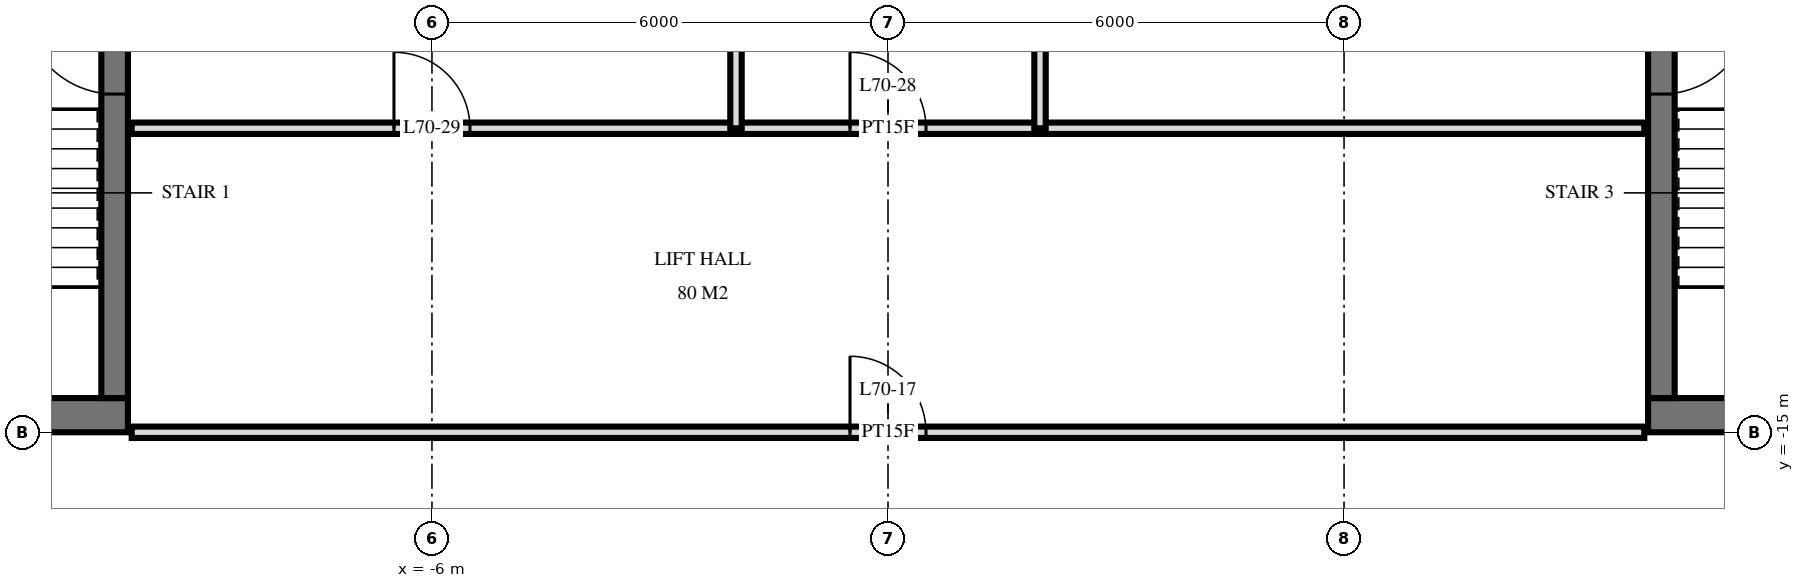
"""IFC4 building model, lengths in metres.
Left out: names, types, materials, properties, quantities, classifications, styles, units other than length and angle.
Written with IfcOpenShell. Run it as: python <this file> out.ifc"""

import sys

from ifc_helpers import new_model, si_unit, direction, frame, frame_2d, origin, place, context, subcontext, project, spatial, rectangle, extrude, element, fill, save


model = new_model("IFC4")
c1 = context("Model", 3, precision=1e-05, world=origin(), true_north=direction((0.0, 1.0)))
c2 = subcontext(c1, "Body", "Model", "MODEL_VIEW")
j1 = project(units=[si_unit("LENGTHUNIT", "METRE"), si_unit("PLANEANGLEUNIT", "RADIAN")], contexts=[c1])
p1 = place(None, origin())
s1 = spatial("IfcSite", under=j1, at=p1, CompositionType="ELEMENT")
p2 = place(p1, origin())
s2 = spatial("IfcBuilding", under=s1, at=p2, CompositionType="ELEMENT")
p3 = place(p2, frame((0.0, 0.0, 266.6)))
s3 = spatial("IfcBuildingStorey", under=s2, at=p3, CompositionType="ELEMENT", Elevation=266.6)
p4 = place(p3, frame((-19.5, -14.775, 0.0), z_axis=(0.0, 0.0, 1.0), x_axis=(1.0, 0.0, 0.0)))
e1 = element("IfcWall", 1, at=p4, inside=s3, PredefinedType="SHEAR", context=c2, shape_type="SweptSolid", body=[
    extrude(rectangle(XDim=9.5, YDim=0.45, at=frame_2d((4.75, 0.0))), origin(), (0.0, 0.0, 1.0), 3.5),
])
p5 = place(p4, frame((1.2, 0.0, 0.0)))
e2 = element("IfcOpeningElement", 2, at=p5, cuts=e1, PredefinedType="OPENING", context=c2, shape_type="SweptSolid", body=[
    extrude(rectangle(XDim=1.2, YDim=2.1, at=frame_2d((0.6, 1.05))), frame((0.0, 0.235, 0.0), z_axis=(0.0, -1.0, 0.0), x_axis=(1.0, 0.0, 0.0)), (0.0, 0.0, 1.0), 0.47),
])
p6 = place(p4, frame((4.25, 0.0, 0.0)))
e3 = element("IfcOpeningElement", 3, at=p6, cuts=e1, PredefinedType="OPENING", context=c2, shape_type="SweptSolid", body=[
    extrude(rectangle(XDim=1.1, YDim=2.1, at=frame_2d((0.55, 1.05))), frame((0.0, 0.235, 0.0), z_axis=(0.0, -1.0, 0.0), x_axis=(1.0, 0.0, 0.0)), (0.0, 0.0, 1.0), 0.47),
])
p7 = place(p3, frame((-10.175, -14.55, 0.0), z_axis=(0.0, 0.0, 1.0), x_axis=(0.0, 1.0, 0.0)))
e4 = element("IfcWall", 4, at=p7, inside=s3, PredefinedType="SHEAR", context=c2, shape_type="SweptSolid", body=[
    extrude(rectangle(XDim=14.1, YDim=0.35, at=frame_2d((7.05, 0.0))), origin(), (0.0, 0.0, 1.0), 3.5),
])
p8 = place(p7, frame((8.4, 0.0, 0.0)))
e5 = element("IfcOpeningElement", 5, at=p8, cuts=e4, PredefinedType="OPENING", context=c2, shape_type="SweptSolid", body=[
    extrude(rectangle(XDim=1.4, YDim=2.4, at=frame_2d((0.7, 1.2))), frame((0.0, 0.185, 0.0), z_axis=(0.0, -1.0, 0.0), x_axis=(1.0, 0.0, 0.0)), (0.0, 0.0, 1.0), 0.37),
])
p9 = place(p7, frame((10.0, 0.0, 0.0)))
e6 = element("IfcOpeningElement", 6, at=p9, cuts=e4, PredefinedType="OPENING", context=c2, shape_type="SweptSolid", body=[
    extrude(rectangle(XDim=1.4, YDim=2.4, at=frame_2d((0.7, 1.2))), frame((0.0, 0.185, 0.0), z_axis=(0.0, -1.0, 0.0), x_axis=(1.0, 0.0, 0.0)), (0.0, 0.0, 1.0), 0.37),
])
p10 = place(p7, frame((4.0, 0.0, 0.0)))
e7 = element("IfcOpeningElement", 7, at=p10, cuts=e4, PredefinedType="OPENING", context=c2, shape_type="SweptSolid", body=[
    extrude(rectangle(XDim=1.2, YDim=2.1, at=frame_2d((0.6, 1.05))), frame((0.0, 0.185, 0.0), z_axis=(0.0, -1.0, 0.0), x_axis=(1.0, 0.0, 0.0)), (0.0, 0.0, 1.0), 0.37),
])
p11 = place(p3, frame((10.0, -14.775, 0.0), z_axis=(0.0, 0.0, 1.0), x_axis=(1.0, 0.0, 0.0)))
e8 = element("IfcWall", 8, at=p11, inside=s3, PredefinedType="SHEAR", context=c2, shape_type="SweptSolid", body=[
    extrude(rectangle(XDim=9.5, YDim=0.45, at=frame_2d((4.75, 0.0))), origin(), (0.0, 0.0, 1.0), 3.5),
])
p12 = place(p11, frame((7.1, 0.0, 0.0)))
e9 = element("IfcOpeningElement", 9, at=p12, cuts=e8, PredefinedType="OPENING", context=c2, shape_type="SweptSolid", body=[
    extrude(rectangle(XDim=1.2, YDim=2.1, at=frame_2d((0.6, 1.05))), frame((0.0, 0.235, 0.0), z_axis=(0.0, -1.0, 0.0), x_axis=(1.0, 0.0, 0.0)), (0.0, 0.0, 1.0), 0.47),
])
p13 = place(p11, frame((4.15, 0.0, 0.0)))
e10 = element("IfcOpeningElement", 10, at=p13, cuts=e8, PredefinedType="OPENING", context=c2, shape_type="SweptSolid", body=[
    extrude(rectangle(XDim=1.1, YDim=2.1, at=frame_2d((0.55, 1.05))), frame((0.0, 0.235, 0.0), z_axis=(0.0, -1.0, 0.0), x_axis=(1.0, 0.0, 0.0)), (0.0, 0.0, 1.0), 0.47),
])
p14 = place(p3, frame((10.175, -14.55, 0.0), z_axis=(0.0, 0.0, 1.0), x_axis=(0.0, 1.0, 0.0)))
e11 = element("IfcWall", 11, at=p14, inside=s3, PredefinedType="SHEAR", context=c2, shape_type="SweptSolid", body=[
    extrude(rectangle(XDim=14.1, YDim=0.35, at=frame_2d((7.05, 0.0))), origin(), (0.0, 0.0, 1.0), 3.5),
])
p15 = place(p14, frame((8.4, 0.0, 0.0)))
e12 = element("IfcOpeningElement", 12, at=p15, cuts=e11, PredefinedType="OPENING", context=c2, shape_type="SweptSolid", body=[
    extrude(rectangle(XDim=1.4, YDim=2.4, at=frame_2d((0.7, 1.2))), frame((0.0, 0.185, 0.0), z_axis=(0.0, -1.0, 0.0), x_axis=(1.0, 0.0, 0.0)), (0.0, 0.0, 1.0), 0.37),
])
p16 = place(p14, frame((10.0, 0.0, 0.0)))
e13 = element("IfcOpeningElement", 13, at=p16, cuts=e11, PredefinedType="OPENING", context=c2, shape_type="SweptSolid", body=[
    extrude(rectangle(XDim=1.4, YDim=2.4, at=frame_2d((0.7, 1.2))), frame((0.0, 0.185, 0.0), z_axis=(0.0, -1.0, 0.0), x_axis=(1.0, 0.0, 0.0)), (0.0, 0.0, 1.0), 0.37),
])
p17 = place(p14, frame((4.0, 0.0, 0.0)))
e14 = element("IfcOpeningElement", 14, at=p17, cuts=e11, PredefinedType="OPENING", context=c2, shape_type="SweptSolid", body=[
    extrude(rectangle(XDim=1.2, YDim=2.1, at=frame_2d((0.6, 1.05))), frame((0.0, 0.185, 0.0), z_axis=(0.0, -1.0, 0.0), x_axis=(1.0, 0.0, 0.0)), (0.0, 0.0, 1.0), 0.37),
])
for number, where, z_axis, x_axis in (
    (15, (2.0, -11.0, 0.0), (0.0, 0.0, 1.0), (0.0, 1.0, 0.0)),
    (16, (-2.0, -11.0, 0.0), (0.0, 0.0, 1.0), (0.0, 1.0, 0.0)),
):
    element("IfcWall", number, at=place(p3, frame(where, z_axis=z_axis, x_axis=x_axis)), inside=s3, PredefinedType="PARTITIONING", context=c2, shape_type="SweptSolid", body=[
        extrude(rectangle(XDim=4.0, YDim=0.15, at=frame_2d((2.0, 0.0))), origin(), (0.0, 0.0, 1.0), 3.22),
    ])
p18 = place(p3, frame((-9.95, -15.0, 0.0), z_axis=(0.0, 0.0, 1.0), x_axis=(1.0, 0.0, 0.0)))
e17 = element("IfcWall", 17, at=p18, inside=s3, PredefinedType="PARTITIONING", context=c2, shape_type="SweptSolid", body=[
    extrude(rectangle(XDim=19.9, YDim=0.15, at=frame_2d((9.95, 0.0))), origin(), (0.0, 0.0, 1.0), 2.584),
])
p19 = place(p18, frame((9.45, 0.0, 0.0)))
e18 = element("IfcOpeningElement", 18, at=p19, cuts=e17, PredefinedType="OPENING", context=c2, shape_type="SweptSolid", body=[
    extrude(rectangle(XDim=1.0, YDim=2.1, at=frame_2d((0.5, 1.05))), frame((0.0, 0.085, 0.0), z_axis=(0.0, -1.0, 0.0), x_axis=(1.0, 0.0, 0.0)), (0.0, 0.0, 1.0), 0.17),
])
p20 = place(p3, frame((-9.95, -11.0, 0.0), z_axis=(0.0, 0.0, 1.0), x_axis=(1.0, 0.0, 0.0)))
e19 = element("IfcWall", 19, at=p20, inside=s3, PredefinedType="PARTITIONING", context=c2, shape_type="SweptSolid", body=[
    extrude(rectangle(XDim=19.9, YDim=0.15, at=frame_2d((9.95, 0.0))), origin(), (0.0, 0.0, 1.0), 3.22),
])
p21 = place(p20, frame((9.45, 0.0, 0.0)))
e20 = element("IfcOpeningElement", 20, at=p21, cuts=e19, PredefinedType="OPENING", context=c2, shape_type="SweptSolid", body=[
    extrude(rectangle(XDim=1.0, YDim=2.1, at=frame_2d((0.5, 1.05))), frame((0.0, 0.085, 0.0), z_axis=(0.0, -1.0, 0.0), x_axis=(1.0, 0.0, 0.0)), (0.0, 0.0, 1.0), 0.17),
])
p22 = place(p20, frame((3.45, 0.0, 0.0)))
e21 = element("IfcOpeningElement", 21, at=p22, cuts=e19, PredefinedType="OPENING", context=c2, shape_type="SweptSolid", body=[
    extrude(rectangle(XDim=1.0, YDim=2.1, at=frame_2d((0.5, 1.05))), frame((0.0, 0.085, 0.0), z_axis=(0.0, -1.0, 0.0), x_axis=(1.0, 0.0, 0.0)), (0.0, 0.0, 1.0), 0.17),
])
p23 = place(p10, origin())
e22 = element("IfcDoor", 22, at=p23, inside=s3, OperationType="SINGLE_SWING_LEFT", PredefinedType="DOOR", context=c2, shape_type="SweptSolid", body=[
    extrude(rectangle(XDim=1.2, YDim=2.1, at=frame_2d((0.6, 1.05))), frame((0.0, 0.025, 0.0), z_axis=(0.0, -1.0, 0.0), x_axis=(1.0, 0.0, 0.0)), (0.0, 0.0, 1.0), 0.05),
])
fill(e7, e22)
p24 = place(p17, frame((0.6, 0.0, 0.0), z_axis=(0.0, 0.0, 1.0), x_axis=(-1.0, 0.0, 0.0)))
e23 = element("IfcDoor", 23, at=p24, inside=s3, OperationType="SINGLE_SWING_RIGHT", PredefinedType="DOOR", context=c2, shape_type="SweptSolid", body=[
    extrude(rectangle(XDim=1.2, YDim=2.1, at=frame_2d((0.0, 1.05))), frame((0.0, -0.025, 0.0), z_axis=(0.0, 1.0, 0.0), x_axis=(-1.0, 0.0, 0.0)), (0.0, 0.0, 1.0), 0.05),
])
fill(e14, e23)
p25 = place(p19, origin())
e24 = element("IfcDoor", 24, at=p25, inside=s3, OperationType="SINGLE_SWING_RIGHT", PredefinedType="DOOR", context=c2, shape_type="SweptSolid", body=[
    extrude(rectangle(XDim=1.0, YDim=2.1, at=frame_2d((0.5, 1.05))), frame((0.0, 0.025, 0.0), z_axis=(0.0, -1.0, 0.0), x_axis=(1.0, 0.0, 0.0)), (0.0, 0.0, 1.0), 0.05),
])
fill(e18, e24)
p26 = place(p21, origin())
e25 = element("IfcDoor", 25, at=p26, inside=s3, OperationType="SINGLE_SWING_RIGHT", PredefinedType="DOOR", context=c2, shape_type="SweptSolid", body=[
    extrude(rectangle(XDim=1.0, YDim=2.1, at=frame_2d((0.5, 1.05))), frame((0.0, 0.025, 0.0), z_axis=(0.0, -1.0, 0.0), x_axis=(1.0, 0.0, 0.0)), (0.0, 0.0, 1.0), 0.05),
])
fill(e20, e25)
p27 = place(p22, origin())
e26 = element("IfcDoor", 26, at=p27, inside=s3, OperationType="SINGLE_SWING_RIGHT", PredefinedType="DOOR", context=c2, shape_type="SweptSolid", body=[
    extrude(rectangle(XDim=1.0, YDim=2.1, at=frame_2d((0.5, 1.05))), frame((0.0, 0.025, 0.0), z_axis=(0.0, -1.0, 0.0), x_axis=(1.0, 0.0, 0.0)), (0.0, 0.0, 1.0), 0.05),
])
fill(e21, e26)
save(model, sys.argv[1])
